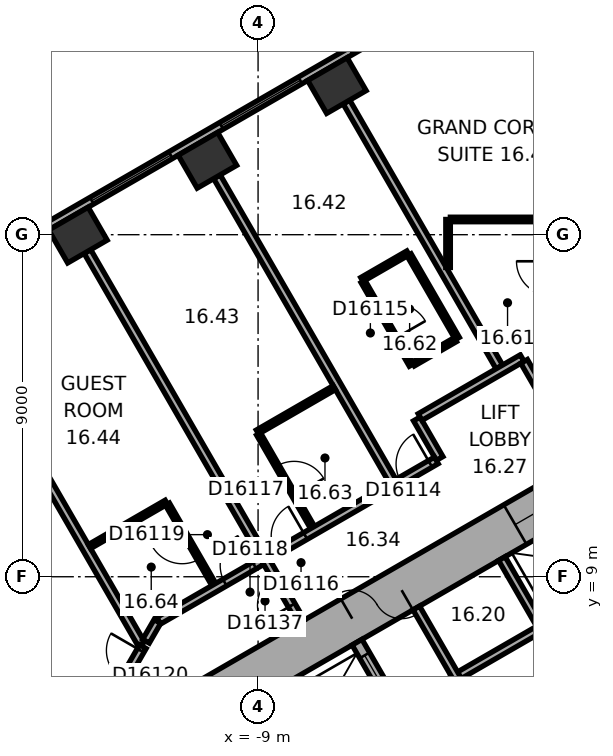
"""IFC4 building model, lengths in metres.
Left out: names, types, materials, properties, quantities, classifications, styles, units other than length and angle.
Written with IfcOpenShell. Run it as: python <this file> out.ifc"""

import sys

from ifc_helpers import new_model, si_unit, direction, frame, frame_2d, origin, origin_2d, place, context, subcontext, project, spatial, rectangle, extrude, element, fill, save


model = new_model("IFC4")
c1 = context("Model", 3, precision=1e-05, world=origin(), true_north=direction((0.0, 1.0)))
c2 = subcontext(c1, "Body", "Model", "MODEL_VIEW")
j1 = project(units=[si_unit("LENGTHUNIT", "METRE"), si_unit("PLANEANGLEUNIT", "RADIAN")], contexts=[c1])
p1 = place(None, origin())
s1 = spatial("IfcSite", under=j1, at=p1, CompositionType="ELEMENT")
p2 = place(p1, origin())
s2 = spatial("IfcBuilding", under=s1, at=p2, CompositionType="ELEMENT")
p3 = place(p2, frame((0.0, 0.0, 73.7)))
s3 = spatial("IfcBuildingStorey", under=s2, at=p3, CompositionType="ELEMENT", Elevation=73.7)
for number, where, z_axis, x_axis in (
    (1, (-6.926, 21.925, 0.0), (0.0, 0.0, 1.0), (-0.866, -0.5, 0.0)),
    (2, (-10.333, 19.957, 0.0), (0.0, 0.0, 1.0), (-0.866, -0.5, 0.0)),
    (3, (-13.74, 17.99, 0.0), (0.0, 0.0, 1.0), (-0.866, -0.5, 0.0)),
):
    element("IfcColumn", number, at=place(p3, frame(where, z_axis=z_axis, x_axis=x_axis)), inside=s3, PredefinedType="COLUMN", context=c2, shape_type="SweptSolid", body=[
        extrude(rectangle(XDim=1.2, YDim=1.0, at=origin_2d()), origin(), (0.0, 0.0, 1.0), 3.3),
    ])
p4 = place(p3, frame((0.3, 11.836, 0.0), z_axis=(0.0, 0.0, 1.0), x_axis=(-0.866021384402, -0.500006961711, 0.0)))
e4 = element("IfcWall", 4, at=p4, inside=s3, PredefinedType="SHEAR", context=c2, shape_type="SweptSolid", body=[
    extrude(rectangle(XDim=12.355, YDim=1.2, at=frame_2d((6.178, 0.0))), origin(), (0.0, 0.0, 1.0), 3.3),
])
p5 = place(p4, frame((6.378, 0.0, 0.0)))
e5 = element("IfcOpeningElement", 5, at=p5, cuts=e4, PredefinedType="OPENING", context=c2, shape_type="SweptSolid", body=[
    extrude(rectangle(XDim=1.5, YDim=2.1, at=frame_2d((0.75, 1.05))), frame((0.0, 0.61, 0.0), z_axis=(0.0, -1.0, 0.0), x_axis=(1.0, 0.0, 0.0)), (0.0, 0.0, 1.0), 1.22),
])
p6 = place(p4, frame((1.828, 0.0, 0.0)))
e6 = element("IfcOpeningElement", 6, at=p6, cuts=e4, PredefinedType="OPENING", context=c2, shape_type="SweptSolid", body=[
    extrude(rectangle(XDim=1.1, YDim=2.1, at=frame_2d((0.55, 1.05))), frame((0.0, 0.61, 0.0), z_axis=(0.0, -1.0, 0.0), x_axis=(1.0, 0.0, 0.0)), (0.0, 0.0, 1.0), 1.22),
])
p7 = place(p3, frame((-3.136, 24.805, 0.0), z_axis=(0.0, 0.0, 1.0), x_axis=(-0.866028291626, -0.499994998079, 0.0)))
e7 = element("IfcWall", 7, at=p7, inside=s3, PredefinedType="STANDARD", context=c2, shape_type="SweptSolid", body=[
    extrude(rectangle(XDim=21.246, YDim=0.2, at=frame_2d((10.623, 0.0))), origin(), (0.0, 0.0, 1.0), 3.3),
])
p8 = place(p7, frame((1.555, 0.0, 0.8)))
e8 = element("IfcOpeningElement", 8, at=p8, cuts=e7, PredefinedType="OPENING", context=c2, shape_type="SweptSolid", body=[
    extrude(rectangle(XDim=2.4, YDim=1.7, at=frame_2d((1.2, 0.85))), frame((0.0, 0.11, 0.0), z_axis=(0.0, -1.0, 0.0), x_axis=(1.0, 0.0, 0.0)), (0.0, 0.0, 1.0), 0.22),
])
p9 = place(p7, frame((5.489, 0.0, 0.8)))
e9 = element("IfcOpeningElement", 9, at=p9, cuts=e7, PredefinedType="OPENING", context=c2, shape_type="SweptSolid", body=[
    extrude(rectangle(XDim=2.4, YDim=1.7, at=frame_2d((1.2, 0.85))), frame((0.0, 0.11, 0.0), z_axis=(0.0, -1.0, 0.0), x_axis=(1.0, 0.0, 0.0)), (0.0, 0.0, 1.0), 0.22),
])
p10 = place(p7, frame((9.424, 0.0, 0.8)))
e10 = element("IfcOpeningElement", 10, at=p10, cuts=e7, PredefinedType="OPENING", context=c2, shape_type="SweptSolid", body=[
    extrude(rectangle(XDim=2.4, YDim=1.7, at=frame_2d((1.2, 0.85))), frame((0.0, 0.11, 0.0), z_axis=(0.0, -1.0, 0.0), x_axis=(1.0, 0.0, 0.0)), (0.0, 0.0, 1.0), 0.22),
])
p11 = place(p7, frame((13.358, 0.0, 0.8)))
e11 = element("IfcOpeningElement", 11, at=p11, cuts=e7, PredefinedType="OPENING", context=c2, shape_type="SweptSolid", body=[
    extrude(rectangle(XDim=2.4, YDim=1.7, at=frame_2d((1.2, 0.85))), frame((0.0, 0.11, 0.0), z_axis=(0.0, -1.0, 0.0), x_axis=(1.0, 0.0, 0.0)), (0.0, 0.0, 1.0), 0.22),
])
p12 = place(p7, frame((17.293, 0.0, 0.8)))
e12 = element("IfcOpeningElement", 12, at=p12, cuts=e7, PredefinedType="OPENING", context=c2, shape_type="SweptSolid", body=[
    extrude(rectangle(XDim=2.4, YDim=1.7, at=frame_2d((1.2, 0.85))), frame((0.0, 0.11, 0.0), z_axis=(0.0, -1.0, 0.0), x_axis=(1.0, 0.0, 0.0)), (0.0, 0.0, 1.0), 0.22),
])
p13 = place(p3, frame((0.803, 9.009, 0.0), z_axis=(0.0, 0.0, 1.0), x_axis=(-0.866028230842, -0.499995103361, 0.0)))
e13 = element("IfcWall", 13, at=p13, inside=s3, PredefinedType="PARTITIONING", context=c2, shape_type="SweptSolid", body=[
    extrude(rectangle(XDim=5.4, YDim=0.2, at=frame_2d((2.7, 0.0))), origin(), (0.0, 0.0, 1.0), 2.95),
])
for number, where, z_axis, x_axis in (
    (14, (-1.485, 7.572, 0.0), (0.0, 0.0, 1.0), (-0.5, 0.866, 0.0)),
    (15, (-3.737, 6.272, 0.0), (0.0, 0.0, 1.0), (-0.5, 0.866, 0.0)),
):
    element("IfcWall", number, at=place(p3, frame(where, z_axis=z_axis, x_axis=x_axis)), inside=s3, PredefinedType="PARTITIONING", context=c2, shape_type="SweptSolid", body=[
        extrude(rectangle(XDim=2.2, YDim=0.2, at=frame_2d((1.1, 0.0))), origin(), (0.0, 0.0, 1.0), 2.95),
    ])
p14 = place(p3, frame((-2.216, 4.282, 0.0), z_axis=(0.0, 0.0, 1.0), x_axis=(0.499977259774, 0.866038532462, 0.0)))
e16 = element("IfcWall", 16, at=p14, inside=s3, PredefinedType="SHEAR", context=c2, shape_type="SweptSolid", body=[
    extrude(rectangle(XDim=4.7, YDim=0.3, at=frame_2d((2.35, 0.0))), origin(), (0.0, 0.0, 1.0), 2.95),
])
p15 = place(p3, frame((-5.295, 5.372, 0.0), z_axis=(0.0, 0.0, 1.0), x_axis=(-0.500077893725, 0.86598042715, 0.0)))
e17 = element("IfcWall", 17, at=p15, inside=s3, PredefinedType="SHEAR", context=c2, shape_type="SweptSolid", body=[
    extrude(rectangle(XDim=2.2, YDim=0.3, at=frame_2d((1.1, 0.0))), origin(), (0.0, 0.0, 1.0), 2.95),
])
p16 = place(p15, frame((0.7, 0.0, 0.0)))
e18 = element("IfcOpeningElement", 18, at=p16, cuts=e17, PredefinedType="OPENING", context=c2, shape_type="SweptSolid", body=[
    extrude(rectangle(XDim=1.1, YDim=2.1, at=frame_2d((0.55, 1.05))), frame((0.0, 0.16, 0.0), z_axis=(0.0, -1.0, 0.0), x_axis=(1.0, 0.0, 0.0)), (0.0, 0.0, 1.0), 0.32),
])
p17 = place(p3, frame((-16.898, 15.59, 0.0), z_axis=(0.0, 0.0, 1.0), x_axis=(0.499994742786, -0.866028439017, 0.0)))
e19 = element("IfcWall", 19, at=p17, inside=s3, PredefinedType="PARTITIONING", context=c2, shape_type="SweptSolid", body=[
    extrude(rectangle(XDim=9.65, YDim=0.2, at=frame_2d((4.825, 0.0))), origin(), (0.0, 0.0, 1.0), 2.95),
])
p18 = place(p3, frame((-13.436, 9.794, 0.0), z_axis=(0.0, 0.0, 1.0), x_axis=(0.866053246676, 0.499951771596, 0.0)))
e20 = element("IfcWall", 20, at=p18, inside=s3, PredefinedType="PARTITIONING", context=c2, shape_type="SweptSolid", body=[
    extrude(rectangle(XDim=2.335, YDim=0.12, at=frame_2d((1.167, 0.0))), origin(), (0.0, 0.0, 1.0), 2.95),
])
p19 = place(p3, frame((-12.032, 7.162, 0.0), z_axis=(0.0, 0.0, 1.0), x_axis=(-0.499951829968, -0.866053212979, 0.0)))
e21 = element("IfcWall", 21, at=p19, inside=s3, PredefinedType="PARTITIONING", context=c2, shape_type="SweptSolid", body=[
    extrude(rectangle(XDim=1.136, YDim=0.2, at=frame_2d((0.568, 0.0))), origin(), (0.0, 0.0, 1.0), 2.95),
])
p20 = place(p19, frame((0.118, 0.0, 0.0)))
e22 = element("IfcOpeningElement", 22, at=p20, cuts=e21, PredefinedType="OPENING", context=c2, shape_type="SweptSolid", body=[
    extrude(rectangle(XDim=0.9, YDim=2.1, at=frame_2d((0.45, 1.05))), frame((0.0, 0.11, 0.0), z_axis=(0.0, -1.0, 0.0), x_axis=(1.0, 0.0, 0.0)), (0.0, 0.0, 1.0), 0.22),
])
p21 = place(p3, frame((-11.65, 7.823, 0.0), z_axis=(0.0, 0.0, 1.0), x_axis=(-0.50012165622, -0.865955154139, 0.0)))
e23 = element("IfcWall", 23, at=p21, inside=s3, PredefinedType="PARTITIONING", context=c2, shape_type="SweptSolid", body=[
    extrude(rectangle(XDim=0.6, YDim=0.2, at=frame_2d((0.3, 0.0))), origin(), (0.0, 0.0, 1.0), 2.95),
])
p22 = place(p3, frame((-11.385, 10.909, 0.0), z_axis=(0.0, 0.0, 1.0), x_axis=(0.500077547548, -0.865980627057, 0.0)))
e24 = element("IfcWall", 24, at=p22, inside=s3, PredefinedType="PARTITIONING", context=c2, shape_type="SweptSolid", body=[
    extrude(rectangle(XDim=2.44, YDim=0.12, at=frame_2d((1.22, 0.0))), origin(), (0.0, 0.0, 1.0), 2.95),
])
p23 = place(p22, frame((0.77, 0.0, 0.0)))
e25 = element("IfcOpeningElement", 25, at=p23, cuts=e24, PredefinedType="OPENING", context=c2, shape_type="SweptSolid", body=[
    extrude(rectangle(XDim=0.9, YDim=2.1, at=frame_2d((0.45, 1.05))), frame((0.0, 0.07, 0.0), z_axis=(0.0, -1.0, 0.0), x_axis=(1.0, 0.0, 0.0)), (0.0, 0.0, 1.0), 0.14),
])
p24 = place(p3, frame((-10.083, 19.524, 0.0), z_axis=(0.0, 0.0, 1.0), x_axis=(0.499999662836, -0.866025598446, 0.0)))
e26 = element("IfcWall", 26, at=p24, inside=s3, PredefinedType="PARTITIONING", context=c2, shape_type="SweptSolid", body=[
    extrude(rectangle(XDim=9.25, YDim=0.2, at=frame_2d((4.625, 0.0))), origin(), (0.0, 0.0, 1.0), 2.15),
])
p25 = place(p3, frame((-9.016, 12.808, 0.0), z_axis=(0.0, 0.0, 1.0), x_axis=(0.86600796803, 0.500030198396, 0.0)))
e27 = element("IfcWall", 27, at=p25, inside=s3, PredefinedType="PARTITIONING", context=c2, shape_type="SweptSolid", body=[
    extrude(rectangle(XDim=2.335, YDim=0.12, at=frame_2d((1.167, 0.0))), origin(), (0.0, 0.0, 1.0), 2.95),
])
p26 = place(p3, frame((-8.902, 9.41, 0.0), z_axis=(0.0, 0.0, 1.0), x_axis=(-0.866014299198, -0.500019233215, 0.0)))
e28 = element("IfcWall", 28, at=p26, inside=s3, PredefinedType="PARTITIONING", context=c2, shape_type="SweptSolid", body=[
    extrude(rectangle(XDim=3.133, YDim=0.2, at=frame_2d((1.567, 0.0))), origin(), (0.0, 0.0, 1.0), 2.95),
])
p27 = place(p26, frame((0.225, 0.0, 0.0)))
e29 = element("IfcOpeningElement", 29, at=p27, cuts=e28, PredefinedType="OPENING", context=c2, shape_type="SweptSolid", body=[
    extrude(rectangle(XDim=0.9, YDim=2.1, at=frame_2d((0.45, 1.05))), frame((0.0, 0.11, 0.0), z_axis=(0.0, -1.0, 0.0), x_axis=(1.0, 0.0, 0.0)), (0.0, 0.0, 1.0), 0.22),
])
p28 = place(p3, frame((-7.865, 7.814, 0.0), z_axis=(0.0, 0.0, 1.0), x_axis=(-0.500004234368, 0.866022959057, 0.0)))
e30 = element("IfcWall", 30, at=p28, inside=s3, PredefinedType="PARTITIONING", context=c2, shape_type="SweptSolid", body=[
    extrude(rectangle(XDim=11.25, YDim=0.2, at=frame_2d((5.625, 0.0))), origin(), (0.0, 0.0, 1.0), 2.95),
])
p29 = place(p28, frame((0.5, 0.0, 0.0)))
e31 = element("IfcOpeningElement", 31, at=p29, cuts=e30, PredefinedType="OPENING", context=c2, shape_type="SweptSolid", body=[
    extrude(rectangle(XDim=0.9, YDim=2.1, at=frame_2d((0.45, 1.05))), frame((0.0, 0.11, 0.0), z_axis=(0.0, -1.0, 0.0), x_axis=(1.0, 0.0, 0.0)), (0.0, 0.0, 1.0), 0.22),
])
p30 = place(p3, frame((-7.566, 10.296, 0.0), z_axis=(0.0, 0.0, 1.0), x_axis=(-0.499985389037, 0.866033839264, 0.0)))
e32 = element("IfcWall", 32, at=p30, inside=s3, PredefinedType="PARTITIONING", context=c2, shape_type="SweptSolid", body=[
    extrude(rectangle(XDim=2.84, YDim=0.12, at=frame_2d((1.42, 0.0))), origin(), (0.0, 0.0, 1.0), 2.95),
])
p31 = place(p30, frame((0.97, 0.0, 0.0)))
e33 = element("IfcOpeningElement", 33, at=p31, cuts=e32, PredefinedType="OPENING", context=c2, shape_type="SweptSolid", body=[
    extrude(rectangle(XDim=0.9, YDim=2.1, at=frame_2d((0.45, 1.05))), frame((0.0, 0.07, 0.0), z_axis=(0.0, -1.0, 0.0), x_axis=(1.0, 0.0, 0.0)), (0.0, 0.0, 1.0), 0.14),
])
p32 = place(p3, frame((-6.676, 21.492, 0.0), z_axis=(0.0, 0.0, 1.0), x_axis=(0.500011263043, -0.866018900966, 0.0)))
e34 = element("IfcWall", 34, at=p32, inside=s3, PredefinedType="PARTITIONING", context=c2, shape_type="SweptSolid", body=[
    extrude(rectangle(XDim=8.049, YDim=0.2, at=frame_2d((4.024, 0.0))), origin(), (0.0, 0.0, 1.0), 2.95),
])
p33 = place(p3, frame((-6.268, 16.82, 0.0), z_axis=(0.0, 0.0, 1.0), x_axis=(0.866002662425, 0.500039387122, 0.0)))
e35 = element("IfcWall", 35, at=p33, inside=s3, PredefinedType="PARTITIONING", context=c2, shape_type="SweptSolid", body=[
    extrude(rectangle(XDim=1.4, YDim=0.12, at=frame_2d((0.7, 0.0))), origin(), (0.0, 0.0, 1.0), 2.95),
])
p34 = place(p3, frame((-5.026, 17.469, 0.0), z_axis=(0.0, 0.0, 1.0), x_axis=(0.500005339912, -0.866022320763, 0.0)))
e36 = element("IfcWall", 36, at=p34, inside=s3, PredefinedType="PARTITIONING", context=c2, shape_type="SweptSolid", body=[
    extrude(rectangle(XDim=2.54, YDim=0.12, at=frame_2d((1.27, 0.0))), origin(), (0.0, 0.0, 1.0), 2.95),
])
p35 = place(p3, frame((-4.968, 14.569, 0.0), z_axis=(0.0, 0.0, 1.0), x_axis=(-0.500046963369, 0.865998287773, 0.0)))
e37 = element("IfcWall", 37, at=p35, inside=s3, PredefinedType="PARTITIONING", context=c2, shape_type="SweptSolid", body=[
    extrude(rectangle(XDim=2.54, YDim=0.12, at=frame_2d((1.27, 0.0))), origin(), (0.0, 0.0, 1.0), 2.95),
])
p36 = place(p35, frame((0.82, 0.0, 0.0)))
e38 = element("IfcOpeningElement", 38, at=p36, cuts=e37, PredefinedType="OPENING", context=c2, shape_type="SweptSolid", body=[
    extrude(rectangle(XDim=0.9, YDim=2.1, at=frame_2d((0.45, 1.05))), frame((0.0, 0.07, 0.0), z_axis=(0.0, -1.0, 0.0), x_axis=(1.0, 0.0, 0.0)), (0.0, 0.0, 1.0), 0.14),
])
p37 = place(p3, frame((-4.823, 13.152, 0.0), z_axis=(0.0, 0.0, 1.0), x_axis=(0.499986357472, -0.866033280158, 0.0)))
e39 = element("IfcWall", 39, at=p37, inside=s3, PredefinedType="PARTITIONING", context=c2, shape_type="SweptSolid", body=[
    extrude(rectangle(XDim=1.201, YDim=0.2, at=frame_2d((0.601, 0.0))), origin(), (0.0, 0.0, 1.0), 2.95),
])
p38 = place(p3, frame((-4.309, 12.061, 0.0), z_axis=(0.0, 0.0, 1.0), x_axis=(-0.866020679205, -0.500008183122, 0.0)))
e40 = element("IfcWall", 40, at=p38, inside=s3, PredefinedType="PARTITIONING", context=c2, shape_type="SweptSolid", body=[
    extrude(rectangle(XDim=5.104, YDim=0.2, at=frame_2d((2.552, 0.0))), origin(), (0.0, 0.0, 1.0), 2.95),
])
p39 = place(p38, frame((0.185, 0.0, 0.0)))
e41 = element("IfcOpeningElement", 41, at=p39, cuts=e40, PredefinedType="OPENING", context=c2, shape_type="SweptSolid", body=[
    extrude(rectangle(XDim=0.9, YDim=2.1, at=frame_2d((0.45, 1.05))), frame((0.0, 0.11, 0.0), z_axis=(0.0, -1.0, 0.0), x_axis=(1.0, 0.0, 0.0)), (0.0, 0.0, 1.0), 0.22),
])
p40 = place(p38, frame((3.979, 0.0, 0.0)))
e42 = element("IfcOpeningElement", 42, at=p40, cuts=e40, PredefinedType="OPENING", context=c2, shape_type="SweptSolid", body=[
    extrude(rectangle(XDim=0.9, YDim=2.1, at=frame_2d((0.45, 1.05))), frame((0.0, 0.11, 0.0), z_axis=(0.0, -1.0, 0.0), x_axis=(1.0, 0.0, 0.0)), (0.0, 0.0, 1.0), 0.22),
])
p41 = place(p3, frame((-4.0, 17.137, 0.0), z_axis=(0.0, 0.0, 1.0), x_axis=(0.0, 1.0, 0.0)))
e43 = element("IfcWall", 43, at=p41, inside=s3, PredefinedType="PARTITIONING", context=c2, shape_type="SweptSolid", body=[
    extrude(rectangle(XDim=1.263, YDim=0.12, at=frame_2d((0.632, 0.0))), origin(), (0.0, 0.0, 1.0), 2.95),
])
p42 = place(p3, frame((-3.94, 18.401, 0.0), z_axis=(0.0, 0.0, 1.0), x_axis=(1.0, 0.0, 0.0)))
e44 = element("IfcWall", 44, at=p42, inside=s3, PredefinedType="PARTITIONING", context=c2, shape_type="SweptSolid", body=[
    extrude(rectangle(XDim=2.64, YDim=0.12, at=frame_2d((1.32, 0.0))), origin(), (0.0, 0.0, 1.0), 2.95),
])
p43 = place(p3, frame((-3.808, 15.239, 0.0), z_axis=(0.0, 0.0, 1.0), x_axis=(-0.866087136806, -0.499893060024, 0.0)))
e45 = element("IfcWall", 45, at=p43, inside=s3, PredefinedType="PARTITIONING", context=c2, shape_type="SweptSolid", body=[
    extrude(rectangle(XDim=1.28, YDim=0.12, at=frame_2d((0.64, 0.0))), origin(), (0.0, 0.0, 1.0), 2.95),
])
p44 = place(p3, frame((-2.05, 14.752, 0.0), z_axis=(0.0, 0.0, 1.0), x_axis=(-0.866030936828, -0.499990416364, 0.0)))
e46 = element("IfcWall", 46, at=p44, inside=s3, PredefinedType="PARTITIONING", context=c2, shape_type="SweptSolid", body=[
    extrude(rectangle(XDim=3.102, YDim=0.2, at=frame_2d((1.551, 0.0))), origin(), (0.0, 0.0, 1.0), 2.95),
])
p45 = place(p3, frame((-1.449, 13.712, 0.0), z_axis=(0.0, 0.0, 1.0), x_axis=(-0.499978356969, 0.866037899034, 0.0)))
e47 = element("IfcWall", 47, at=p45, inside=s3, PredefinedType="PARTITIONING", context=c2, shape_type="SweptSolid", body=[
    extrude(rectangle(XDim=1.101, YDim=0.2, at=frame_2d((0.551, 0.0))), origin(), (0.0, 0.0, 1.0), 2.95),
])
p46 = place(p3, frame((-1.3, 15.301, 0.0), z_axis=(0.0, 0.0, 1.0), x_axis=(-1.0, 0.0, 0.0)))
e48 = element("IfcWall", 48, at=p46, inside=s3, PredefinedType="PARTITIONING", context=c2, shape_type="SweptSolid", body=[
    extrude(rectangle(XDim=1.661, YDim=0.12, at=frame_2d((0.831, 0.0))), origin(), (0.0, 0.0, 1.0), 2.95),
])
p47 = place(p9, origin())
e49 = element("IfcWindow", 49, at=p47, inside=s3, PartitioningType="SINGLE_PANEL", PredefinedType="WINDOW", context=c2, shape_type="SweptSolid", body=[
    extrude(rectangle(XDim=2.4, YDim=1.7, at=frame_2d((1.2, 0.85))), frame((0.0, 0.03, 0.0), z_axis=(0.0, -1.0, 0.0), x_axis=(1.0, 0.0, 0.0)), (0.0, 0.0, 1.0), 0.06),
])
fill(e9, e49)
p48 = place(p10, origin())
e50 = element("IfcWindow", 50, at=p48, inside=s3, PartitioningType="SINGLE_PANEL", PredefinedType="WINDOW", context=c2, shape_type="SweptSolid", body=[
    extrude(rectangle(XDim=2.4, YDim=1.7, at=frame_2d((1.2, 0.85))), frame((0.0, 0.03, 0.0), z_axis=(0.0, -1.0, 0.0), x_axis=(1.0, 0.0, 0.0)), (0.0, 0.0, 1.0), 0.06),
])
fill(e10, e50)
p49 = place(p5, origin())
e51 = element("IfcDoor", 51, at=p49, inside=s3, OperationType="DOUBLE_DOOR_SINGLE_SWING", PredefinedType="DOOR", context=c2, shape_type="SweptSolid", body=[
    extrude(rectangle(XDim=1.5, YDim=2.1, at=frame_2d((0.75, 1.05))), frame((0.0, 0.025, 0.0), z_axis=(0.0, -1.0, 0.0), x_axis=(1.0, 0.0, 0.0)), (0.0, 0.0, 1.0), 0.05),
])
fill(e5, e51)
p50 = place(p16, origin())
e52 = element("IfcDoor", 52, at=p50, inside=s3, OperationType="DOUBLE_DOOR_SLIDING", PredefinedType="DOOR", context=c2, shape_type="SweptSolid", body=[
    extrude(rectangle(XDim=1.1, YDim=2.1, at=frame_2d((0.55, 1.05))), frame((0.0, 0.025, 0.0), z_axis=(0.0, -1.0, 0.0), x_axis=(1.0, 0.0, 0.0)), (0.0, 0.0, 1.0), 0.05),
])
fill(e18, e52)
p51 = place(p6, origin())
e53 = element("IfcDoor", 53, at=p51, inside=s3, OperationType="DOUBLE_DOOR_SLIDING", PredefinedType="DOOR", context=c2, shape_type="SweptSolid", body=[
    extrude(rectangle(XDim=1.1, YDim=2.1, at=frame_2d((0.55, 1.05))), frame((0.0, 0.025, 0.0), z_axis=(0.0, -1.0, 0.0), x_axis=(1.0, 0.0, 0.0)), (0.0, 0.0, 1.0), 0.05),
])
fill(e6, e53)
p52 = place(p39, origin())
e54 = element("IfcDoor", 54, at=p52, inside=s3, OperationType="SINGLE_SWING_LEFT", PredefinedType="DOOR", context=c2, shape_type="SweptSolid", body=[
    extrude(rectangle(XDim=0.9, YDim=2.1, at=frame_2d((0.45, 1.05))), frame((0.0, 0.025, 0.0), z_axis=(0.0, -1.0, 0.0), x_axis=(1.0, 0.0, 0.0)), (0.0, 0.0, 1.0), 0.05),
])
fill(e41, e54)
p53 = place(p36, origin())
e55 = element("IfcDoor", 55, at=p53, inside=s3, OperationType="SINGLE_SWING_LEFT", PredefinedType="DOOR", context=c2, shape_type="SweptSolid", body=[
    extrude(rectangle(XDim=0.9, YDim=2.1, at=frame_2d((0.45, 1.05))), frame((0.0, 0.025, 0.0), z_axis=(0.0, -1.0, 0.0), x_axis=(1.0, 0.0, 0.0)), (0.0, 0.0, 1.0), 0.05),
])
fill(e38, e55)
p54 = place(p40, origin())
e56 = element("IfcDoor", 56, at=p54, inside=s3, OperationType="SINGLE_SWING_LEFT", PredefinedType="DOOR", context=c2, shape_type="SweptSolid", body=[
    extrude(rectangle(XDim=0.9, YDim=2.1, at=frame_2d((0.45, 1.05))), frame((0.0, 0.025, 0.0), z_axis=(0.0, -1.0, 0.0), x_axis=(1.0, 0.0, 0.0)), (0.0, 0.0, 1.0), 0.05),
])
fill(e42, e56)
p55 = place(p31, origin())
e57 = element("IfcDoor", 57, at=p55, inside=s3, OperationType="SINGLE_SWING_LEFT", PredefinedType="DOOR", context=c2, shape_type="SweptSolid", body=[
    extrude(rectangle(XDim=0.9, YDim=2.1, at=frame_2d((0.45, 1.05))), frame((0.0, 0.025, 0.0), z_axis=(0.0, -1.0, 0.0), x_axis=(1.0, 0.0, 0.0)), (0.0, 0.0, 1.0), 0.05),
])
fill(e33, e57)
p56 = place(p27, origin())
e58 = element("IfcDoor", 58, at=p56, inside=s3, OperationType="SINGLE_SWING_LEFT", PredefinedType="DOOR", context=c2, shape_type="SweptSolid", body=[
    extrude(rectangle(XDim=0.9, YDim=2.1, at=frame_2d((0.45, 1.05))), frame((0.0, 0.025, 0.0), z_axis=(0.0, -1.0, 0.0), x_axis=(1.0, 0.0, 0.0)), (0.0, 0.0, 1.0), 0.05),
])
fill(e29, e58)
p57 = place(p23, origin())
e59 = element("IfcDoor", 59, at=p57, inside=s3, OperationType="SINGLE_SWING_LEFT", PredefinedType="DOOR", context=c2, shape_type="SweptSolid", body=[
    extrude(rectangle(XDim=0.9, YDim=2.1, at=frame_2d((0.45, 1.05))), frame((0.0, 0.025, 0.0), z_axis=(0.0, -1.0, 0.0), x_axis=(1.0, 0.0, 0.0)), (0.0, 0.0, 1.0), 0.05),
])
fill(e25, e59)
p58 = place(p20, origin())
e60 = element("IfcDoor", 60, at=p58, inside=s3, OperationType="SINGLE_SWING_LEFT", PredefinedType="DOOR", context=c2, shape_type="SweptSolid", body=[
    extrude(rectangle(XDim=0.9, YDim=2.1, at=frame_2d((0.45, 1.05))), frame((0.0, 0.025, 0.0), z_axis=(0.0, -1.0, 0.0), x_axis=(1.0, 0.0, 0.0)), (0.0, 0.0, 1.0), 0.05),
])
fill(e22, e60)
p59 = place(p29, origin())
e61 = element("IfcDoor", 61, at=p59, inside=s3, OperationType="SINGLE_SWING_LEFT", PredefinedType="DOOR", context=c2, shape_type="SweptSolid", body=[
    extrude(rectangle(XDim=0.9, YDim=2.1, at=frame_2d((0.45, 1.05))), frame((0.0, 0.025, 0.0), z_axis=(0.0, -1.0, 0.0), x_axis=(1.0, 0.0, 0.0)), (0.0, 0.0, 1.0), 0.05),
])
fill(e31, e61)
save(model, sys.argv[1])
